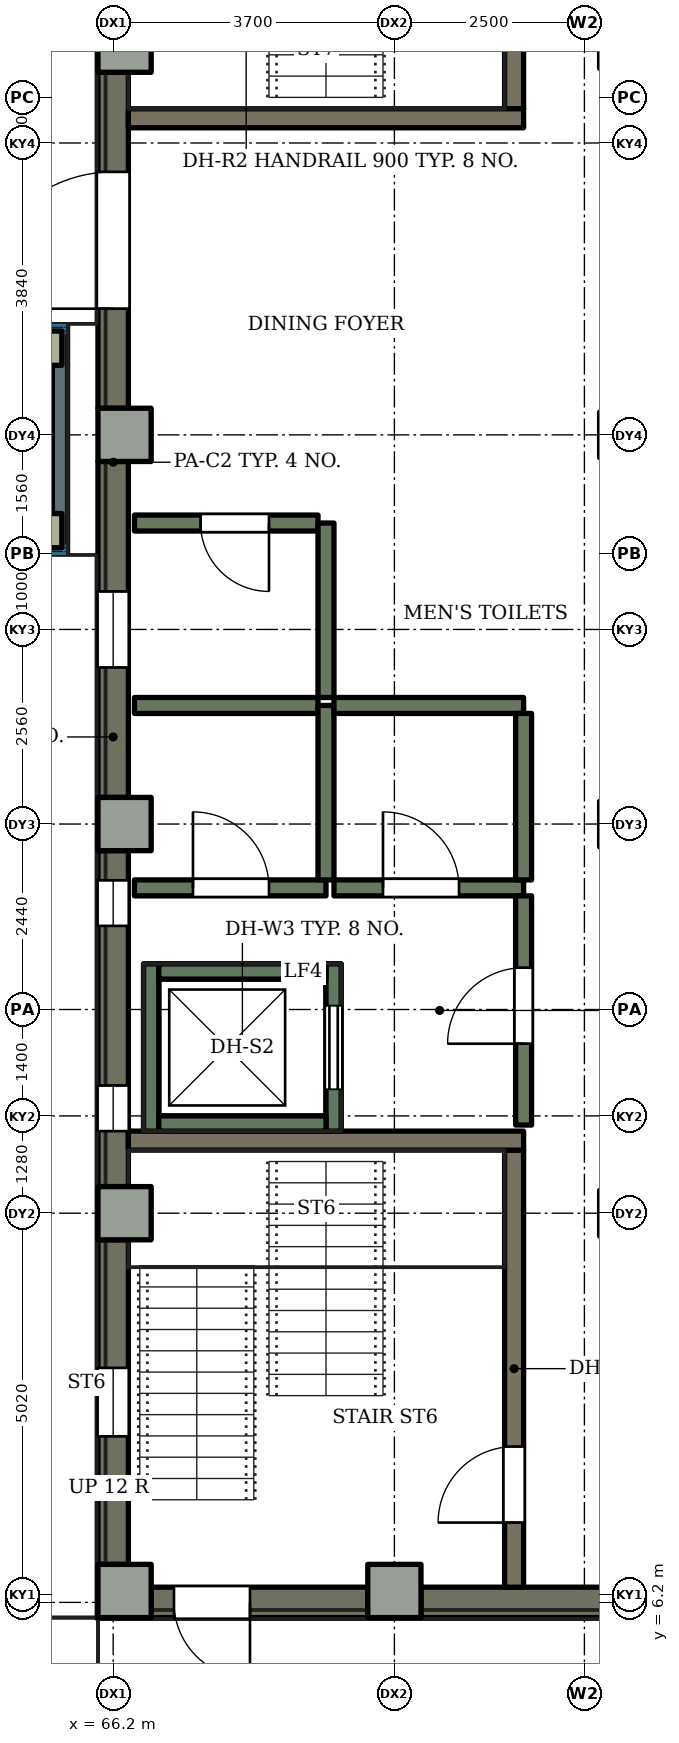
"""IFC4 building model, lengths in metres.
Left out: names, types, materials, properties, quantities, classifications, styles, units other than length and angle.
Written with IfcOpenShell. Run it as: python <this file> out.ifc"""

import sys

from ifc_helpers import new_model, si_unit, direction, frame, frame_2d, origin, origin_2d, place, context, subcontext, project, spatial, rectangle, extrude, element, fill, save


model = new_model("IFC4")
c1 = context("Model", 3, precision=1e-05, world=origin(), true_north=direction((0.0, 1.0)))
c2 = subcontext(c1, "Body", "Model", "MODEL_VIEW")
j1 = project(units=[si_unit("LENGTHUNIT", "METRE"), si_unit("PLANEANGLEUNIT", "RADIAN")], contexts=[c1])
p1 = place(None, origin())
s1 = spatial("IfcSite", under=j1, at=p1, CompositionType="ELEMENT")
p2 = place(p1, origin())
s2 = spatial("IfcBuilding", under=s1, at=p2, CompositionType="ELEMENT")
p3 = place(p2, origin())
s3 = spatial("IfcBuildingStorey", under=s2, at=p3, CompositionType="ELEMENT", Elevation=0.0)
for number, where, z_axis, x_axis in (
    (1, (66.35, 6.35, 0.0), (0.0, 0.0, 1.0), (1.0, 0.0, 0.0)),
    (2, (69.9, 6.35, 0.0), (0.0, 0.0, 1.0), (1.0, 0.0, 0.0)),
    (3, (66.35, 11.32, 0.0), (0.0, 0.0, 1.0), (1.0, 0.0, 0.0)),
    (4, (66.35, 16.44, 0.0), (0.0, 0.0, 1.0), (1.0, 0.0, 0.0)),
    (5, (66.35, 21.56, 0.0), (0.0, 0.0, 1.0), (1.0, 0.0, 0.0)),
    (6, (66.35, 26.68, 0.0), (0.0, 0.0, 1.0), (1.0, 0.0, 0.0)),
):
    element("IfcColumn", number, at=place(p3, frame(where, z_axis=z_axis, x_axis=x_axis)), inside=s3, PredefinedType="COLUMN", context=c2, shape_type="SweptSolid", body=[
        extrude(rectangle(XDim=0.7, YDim=0.7, at=origin_2d()), origin(), (0.0, 0.0, 1.0), 4.2),
    ])
p4 = place(p3, frame((69.55, 6.2, 0.0), z_axis=(0.0, 0.0, 1.0), x_axis=(-1.0, 0.0, 0.0)))
e7 = element("IfcWall", 7, at=p4, inside=s3, PredefinedType="SOLIDWALL", context=c2, shape_type="SweptSolid", body=[
    extrude(rectangle(XDim=2.85, YDim=0.4, at=frame_2d((1.425, 0.0))), origin(), (0.0, 0.0, 1.0), 4.2),
])
p5 = place(p4, frame((1.55, 0.0, 0.0)))
e8 = element("IfcOpeningElement", 8, at=p5, cuts=e7, PredefinedType="OPENING", context=c2, shape_type="SweptSolid", body=[
    extrude(rectangle(XDim=1.0, YDim=2.4, at=frame_2d((0.5, 1.2))), frame((0.0, 0.21, 0.0), z_axis=(0.0, -1.0, 0.0), x_axis=(1.0, 0.0, 0.0)), (0.0, 0.0, 1.0), 0.42),
])
p6 = place(p3, frame((73.25, 6.2, 0.0), z_axis=(0.0, 0.0, 1.0), x_axis=(-1.0, 0.0, 0.0)))
e9 = element("IfcWall", 9, at=p6, inside=s3, PredefinedType="SOLIDWALL", context=c2, shape_type="SweptSolid", body=[
    extrude(rectangle(XDim=3.0, YDim=0.4, at=frame_2d((1.5, 0.0))), origin(), (0.0, 0.0, 1.0), 4.2),
])
p7 = place(p3, frame((66.2, 6.7, 0.0), z_axis=(0.0, 0.0, 1.0), x_axis=(0.0, 1.0, 0.0)))
e10 = element("IfcWall", 10, at=p7, inside=s3, PredefinedType="SOLIDWALL", context=c2, shape_type="SweptSolid", body=[
    extrude(rectangle(XDim=4.27, YDim=0.4, at=frame_2d((2.135, 0.0))), origin(), (0.0, 0.0, 1.0), 4.2),
])
p8 = place(p7, frame((1.685, 0.0, 0.9)))
e11 = element("IfcOpeningElement", 11, at=p8, cuts=e10, PredefinedType="OPENING", context=c2, shape_type="SweptSolid", body=[
    extrude(rectangle(XDim=0.9, YDim=1.8, at=frame_2d((0.45, 0.9))), frame((0.0, 0.21, 0.0), z_axis=(0.0, -1.0, 0.0), x_axis=(1.0, 0.0, 0.0)), (0.0, 0.0, 1.0), 0.42),
])
p9 = place(p3, frame((66.2, 11.67, 0.0), z_axis=(0.0, 0.0, 1.0), x_axis=(0.0, 1.0, 0.0)))
e12 = element("IfcWall", 12, at=p9, inside=s3, PredefinedType="SOLIDWALL", context=c2, shape_type="SweptSolid", body=[
    extrude(rectangle(XDim=4.42, YDim=0.4, at=frame_2d((2.21, 0.0))), origin(), (0.0, 0.0, 1.0), 4.2),
])
p10 = place(p9, frame((0.73, 0.0, 1.5)))
e13 = element("IfcOpeningElement", 13, at=p10, cuts=e12, PredefinedType="OPENING", context=c2, shape_type="SweptSolid", body=[
    extrude(rectangle(XDim=0.6, YDim=1.2, at=frame_2d((0.3, 0.6))), frame((0.0, 0.21, 0.0), z_axis=(0.0, -1.0, 0.0), x_axis=(1.0, 0.0, 0.0)), (0.0, 0.0, 1.0), 0.42),
])
p11 = place(p9, frame((3.43, 0.0, 1.5)))
e14 = element("IfcOpeningElement", 14, at=p11, cuts=e12, PredefinedType="OPENING", context=c2, shape_type="SweptSolid", body=[
    extrude(rectangle(XDim=0.6, YDim=1.2, at=frame_2d((0.3, 0.6))), frame((0.0, 0.21, 0.0), z_axis=(0.0, -1.0, 0.0), x_axis=(1.0, 0.0, 0.0)), (0.0, 0.0, 1.0), 0.42),
])
p12 = place(p3, frame((66.2, 16.79, 0.0), z_axis=(0.0, 0.0, 1.0), x_axis=(0.0, 1.0, 0.0)))
e15 = element("IfcWall", 15, at=p12, inside=s3, PredefinedType="SOLIDWALL", context=c2, shape_type="SweptSolid", body=[
    extrude(rectangle(XDim=4.42, YDim=0.4, at=frame_2d((2.21, 0.0))), origin(), (0.0, 0.0, 1.0), 4.2),
])
p13 = place(p12, frame((1.71, 0.0, 0.9)))
e16 = element("IfcOpeningElement", 16, at=p13, cuts=e15, PredefinedType="OPENING", context=c2, shape_type="SweptSolid", body=[
    extrude(rectangle(XDim=1.0, YDim=2.4, at=frame_2d((0.5, 1.2))), frame((0.0, 0.21, 0.0), z_axis=(0.0, -1.0, 0.0), x_axis=(1.0, 0.0, 0.0)), (0.0, 0.0, 1.0), 0.42),
])
p14 = place(p3, frame((66.2, 21.91, 0.0), z_axis=(0.0, 0.0, 1.0), x_axis=(0.0, 1.0, 0.0)))
e17 = element("IfcWall", 17, at=p14, inside=s3, PredefinedType="SOLIDWALL", context=c2, shape_type="SweptSolid", body=[
    extrude(rectangle(XDim=4.42, YDim=0.4, at=frame_2d((2.21, 0.0))), origin(), (0.0, 0.0, 1.0), 4.2),
])
p15 = place(p14, frame((1.31, 0.0, 0.0)))
e18 = element("IfcOpeningElement", 18, at=p15, cuts=e17, PredefinedType="OPENING", context=c2, shape_type="SweptSolid", body=[
    extrude(rectangle(XDim=1.8, YDim=2.4, at=frame_2d((0.9, 1.2))), frame((0.0, 0.21, 0.0), z_axis=(0.0, -1.0, 0.0), x_axis=(1.0, 0.0, 0.0)), (0.0, 0.0, 1.0), 0.42),
])
p16 = place(p3, frame((71.475, 6.4, 0.0), z_axis=(0.0, 0.0, 1.0), x_axis=(0.0, 1.0, 0.0)))
e19 = element("IfcWall", 19, at=p16, inside=s3, PredefinedType="SHEAR", context=c2, shape_type="SweptSolid", body=[
    extrude(rectangle(XDim=5.75, YDim=0.25, at=frame_2d((2.875, 0.0))), origin(), (0.0, 0.0, 1.0), 4.2),
])
p17 = place(p16, frame((0.85, 0.0, 0.0)))
e20 = element("IfcOpeningElement", 20, at=p17, cuts=e19, PredefinedType="OPENING", context=c2, shape_type="SweptSolid", body=[
    extrude(rectangle(XDim=1.0, YDim=2.1, at=frame_2d((0.5, 1.05))), frame((0.0, 0.135, 0.0), z_axis=(0.0, -1.0, 0.0), x_axis=(1.0, 0.0, 0.0)), (0.0, 0.0, 1.0), 0.27),
])
p18 = place(p3, frame((66.4, 12.275, 0.0), z_axis=(0.0, 0.0, 1.0), x_axis=(1.0, 0.0, 0.0)))
e21 = element("IfcWall", 21, at=p18, inside=s3, PredefinedType="SHEAR", context=c2, shape_type="SweptSolid", body=[
    extrude(rectangle(XDim=5.2, YDim=0.25, at=frame_2d((2.6, 0.0))), origin(), (0.0, 0.0, 1.0), 4.2),
])
p19 = place(p3, frame((71.475, 25.85, 0.0), z_axis=(0.0, 0.0, 1.0), x_axis=(0.0, 1.0, 0.0)))
e22 = element("IfcWall", 22, at=p19, inside=s3, PredefinedType="SHEAR", context=c2, shape_type="SweptSolid", body=[
    extrude(rectangle(XDim=5.75, YDim=0.25, at=frame_2d((2.875, 0.0))), origin(), (0.0, 0.0, 1.0), 4.2),
])
p20 = place(p19, frame((3.914, 0.0, 0.0)))
e23 = element("IfcOpeningElement", 23, at=p20, cuts=e22, PredefinedType="OPENING", context=c2, shape_type="SweptSolid", body=[
    extrude(rectangle(XDim=1.0, YDim=2.1, at=frame_2d((0.5, 1.05))), frame((0.0, 0.135, 0.0), z_axis=(0.0, -1.0, 0.0), x_axis=(1.0, 0.0, 0.0)), (0.0, 0.0, 1.0), 0.27),
])
p21 = place(p3, frame((66.4, 25.725, 0.0), z_axis=(0.0, 0.0, 1.0), x_axis=(1.0, 0.0, 0.0)))
e24 = element("IfcWall", 24, at=p21, inside=s3, PredefinedType="SHEAR", context=c2, shape_type="SweptSolid", body=[
    extrude(rectangle(XDim=5.2, YDim=0.25, at=frame_2d((2.6, 0.0))), origin(), (0.0, 0.0, 1.0), 4.2),
])
p22 = place(p3, frame((66.7, 12.4, 0.0), z_axis=(0.0, 0.0, 1.0), x_axis=(0.0, 1.0, 0.0)))
e25 = element("IfcWall", 25, at=p22, inside=s3, PredefinedType="SHEAR", context=c2, shape_type="SweptSolid", body=[
    extrude(rectangle(XDim=2.2, YDim=0.2, at=frame_2d((1.1, 0.0))), origin(), (0.0, 0.0, 1.0), 4.2),
])
p23 = place(p3, frame((69.1, 12.4, 0.0), z_axis=(0.0, 0.0, 1.0), x_axis=(0.0, 1.0, 0.0)))
e26 = element("IfcWall", 26, at=p23, inside=s3, PredefinedType="SHEAR", context=c2, shape_type="SweptSolid", body=[
    extrude(rectangle(XDim=2.2, YDim=0.2, at=frame_2d((1.1, 0.0))), origin(), (0.0, 0.0, 1.0), 4.2),
])
p24 = place(p23, frame((0.55, 0.0, 0.0)))
e27 = element("IfcOpeningElement", 27, at=p24, cuts=e26, PredefinedType="OPENING", context=c2, shape_type="SweptSolid", body=[
    extrude(rectangle(XDim=1.1, YDim=2.1, at=frame_2d((0.55, 1.05))), frame((0.0, 0.11, 0.0), z_axis=(0.0, -1.0, 0.0), x_axis=(1.0, 0.0, 0.0)), (0.0, 0.0, 1.0), 0.22),
])
for number, where, z_axis, x_axis in (
    (28, (66.8, 12.5, 0.0), (0.0, 0.0, 1.0), (1.0, 0.0, 0.0)),
    (29, (66.8, 14.5, 0.0), (0.0, 0.0, 1.0), (1.0, 0.0, 0.0)),
):
    element("IfcWall", number, at=place(p3, frame(where, z_axis=z_axis, x_axis=x_axis)), inside=s3, PredefinedType="SHEAR", context=c2, shape_type="SweptSolid", body=[
        extrude(rectangle(XDim=2.2, YDim=0.2, at=frame_2d((1.1, 0.0))), origin(), (0.0, 0.0, 1.0), 4.2),
    ])
for number, where, z_axis, x_axis in (
    (30, (66.7, 12.4, -1.4), (0.0, 0.0, 1.0), (0.0, 1.0, 0.0)),
    (31, (69.1, 12.4, -1.4), (0.0, 0.0, 1.0), (0.0, 1.0, 0.0)),
):
    element("IfcWall", number, at=place(p3, frame(where, z_axis=z_axis, x_axis=x_axis)), inside=s3, PredefinedType="SHEAR", context=c2, shape_type="SweptSolid", body=[
        extrude(rectangle(XDim=2.2, YDim=0.2, at=frame_2d((1.1, 0.0))), origin(), (0.0, 0.0, 1.0), 1.4),
    ])
for number, where, z_axis, x_axis in (
    (32, (66.8, 12.5, -1.4), (0.0, 0.0, 1.0), (1.0, 0.0, 0.0)),
    (33, (66.8, 14.5, -1.4), (0.0, 0.0, 1.0), (1.0, 0.0, 0.0)),
):
    element("IfcWall", number, at=place(p3, frame(where, z_axis=z_axis, x_axis=x_axis)), inside=s3, PredefinedType="SHEAR", context=c2, shape_type="SweptSolid", body=[
        extrude(rectangle(XDim=2.2, YDim=0.2, at=frame_2d((1.1, 0.0))), origin(), (0.0, 0.0, 1.0), 1.4),
    ])
for number, where, z_axis, x_axis in (
    (34, (72.9, 11.32, 0.0), (0.0, 0.0, 1.0), (1.0, 0.0, 0.0)),
    (35, (72.9, 16.44, 0.0), (0.0, 0.0, 1.0), (1.0, 0.0, 0.0)),
    (36, (72.9, 21.56, 0.0), (0.0, 0.0, 1.0), (1.0, 0.0, 0.0)),
    (37, (72.9, 26.68, 0.0), (0.0, 0.0, 1.0), (1.0, 0.0, 0.0)),
):
    element("IfcColumn", number, at=place(p3, frame(where, z_axis=z_axis, x_axis=x_axis)), inside=s3, PredefinedType="COLUMN", context=c2, shape_type="SweptSolid", body=[
        extrude(rectangle(XDim=0.6, YDim=0.6, at=origin_2d()), origin(), (0.0, 0.0, 1.0), 4.2),
    ])
for number, where, z_axis, x_axis in (
    (38, (65.3, 20.3, 0.0), (0.0, 0.0, 1.0), (1.0, 0.0, 0.0)),
    (39, (65.3, 22.7, 0.0), (0.0, 0.0, 1.0), (1.0, 0.0, 0.0)),
):
    element("IfcColumn", number, at=place(p3, frame(where, z_axis=z_axis, x_axis=x_axis)), inside=s3, PredefinedType="COLUMN", context=c2, shape_type="SweptSolid", body=[
        extrude(rectangle(XDim=0.45, YDim=0.45, at=origin_2d()), origin(), (0.0, 0.0, 1.0), 3.78),
    ])
p25 = place(p3, frame((65.5, 20.0, 4.0), z_axis=(0.0, 0.0, 1.0), x_axis=(0.0, 1.0, 0.0)))
e40 = element("IfcWall", 40, at=p25, inside=s3, PredefinedType="PARAPET", context=c2, shape_type="SweptSolid", body=[
    extrude(rectangle(XDim=3.0, YDim=0.2, at=frame_2d((1.5, 0.0))), origin(), (0.0, 0.0, 1.0), 0.45),
])
for number, where, z_axis, x_axis in (
    (41, (66.4, 11.59, 0.0), (0.0, 0.0, 1.0), (0.0, -1.0, 0.0)),
    (42, (66.4, 16.71, 0.0), (0.0, 0.0, 1.0), (0.0, -1.0, 0.0)),
    (43, (66.4, 21.83, 0.0), (0.0, 0.0, 1.0), (0.0, -1.0, 0.0)),
    (44, (66.4, 26.95, 0.0), (0.0, 0.0, 1.0), (0.0, -1.0, 0.0)),
):
    element("IfcWall", number, at=place(p3, frame(where, z_axis=z_axis, x_axis=x_axis)), inside=s3, PredefinedType="PARTITIONING", context=c2, shape_type="SweptSolid", body=[
        extrude(rectangle(XDim=0.54, YDim=0.21, at=frame_2d((0.27, 0.0))), origin(), (0.0, 0.0, 1.0), 3.98),
    ])
p26 = place(p3, frame((66.48, 15.6, 0.0), z_axis=(0.0, 0.0, 1.0), x_axis=(1.0, 0.0, 0.0)))
e45 = element("IfcWall", 45, at=p26, inside=s3, PredefinedType="PARTITIONING", context=c2, shape_type="SweptSolid", body=[
    extrude(rectangle(XDim=2.52, YDim=0.21, at=frame_2d((1.26, 0.0))), origin(), (0.0, 0.0, 1.0), 3.98),
])
p27 = place(p26, frame((0.77, 0.0, 0.0)))
e46 = element("IfcOpeningElement", 46, at=p27, cuts=e45, PredefinedType="OPENING", context=c2, shape_type="SweptSolid", body=[
    extrude(rectangle(XDim=1.0, YDim=2.1, at=frame_2d((0.5, 1.05))), frame((0.0, 0.115, 0.0), z_axis=(0.0, -1.0, 0.0), x_axis=(1.0, 0.0, 0.0)), (0.0, 0.0, 1.0), 0.23),
])
p28 = place(p3, frame((68.895, 18.0, 0.0), z_axis=(0.0, 0.0, 1.0), x_axis=(-1.0, 0.0, 0.0)))
e47 = element("IfcWall", 47, at=p28, inside=s3, PredefinedType="PARTITIONING", context=c2, shape_type="SweptSolid", body=[
    extrude(rectangle(XDim=2.415, YDim=0.21, at=frame_2d((1.208, 0.0))), origin(), (0.0, 0.0, 1.0), 3.98),
])
p29 = place(p3, frame((68.895, 20.4, 0.0), z_axis=(0.0, 0.0, 1.0), x_axis=(-1.0, 0.0, 0.0)))
e48 = element("IfcWall", 48, at=p29, inside=s3, PredefinedType="PARTITIONING", context=c2, shape_type="SweptSolid", body=[
    extrude(rectangle(XDim=2.415, YDim=0.21, at=frame_2d((1.208, 0.0))), origin(), (0.0, 0.0, 1.0), 3.98),
])
p30 = place(p29, frame((0.645, 0.0, 0.0)))
e49 = element("IfcOpeningElement", 49, at=p30, cuts=e48, PredefinedType="OPENING", context=c2, shape_type="SweptSolid", body=[
    extrude(rectangle(XDim=0.9, YDim=2.1, at=frame_2d((0.45, 1.05))), frame((0.0, 0.115, 0.0), z_axis=(0.0, -1.0, 0.0), x_axis=(1.0, 0.0, 0.0)), (0.0, 0.0, 1.0), 0.23),
])
for number, where, z_axis, x_axis in (
    (50, (69.0, 15.705, 0.0), (0.0, 0.0, 1.0), (0.0, 1.0, 0.0)),
    (51, (69.0, 18.105, 0.0), (0.0, 0.0, 1.0), (0.0, 1.0, 0.0)),
):
    element("IfcWall", number, at=place(p3, frame(where, z_axis=z_axis, x_axis=x_axis)), inside=s3, PredefinedType="PARTITIONING", context=c2, shape_type="SweptSolid", body=[
        extrude(rectangle(XDim=2.295, YDim=0.21, at=frame_2d((1.147, 0.0))), origin(), (0.0, 0.0, 1.0), 3.98),
    ])
p31 = place(p3, frame((69.105, 15.6, 0.0), z_axis=(0.0, 0.0, 1.0), x_axis=(1.0, 0.0, 0.0)))
e52 = element("IfcWall", 52, at=p31, inside=s3, PredefinedType="PARTITIONING", context=c2, shape_type="SweptSolid", body=[
    extrude(rectangle(XDim=2.495, YDim=0.21, at=frame_2d((1.248, 0.0))), origin(), (0.0, 0.0, 1.0), 3.98),
])
p32 = place(p31, frame((0.645, 0.0, 0.0)))
e53 = element("IfcOpeningElement", 53, at=p32, cuts=e52, PredefinedType="OPENING", context=c2, shape_type="SweptSolid", body=[
    extrude(rectangle(XDim=1.0, YDim=2.1, at=frame_2d((0.5, 1.05))), frame((0.0, 0.115, 0.0), z_axis=(0.0, -1.0, 0.0), x_axis=(1.0, 0.0, 0.0)), (0.0, 0.0, 1.0), 0.23),
])
p33 = place(p3, frame((69.105, 18.0, 0.0), z_axis=(0.0, 0.0, 1.0), x_axis=(1.0, 0.0, 0.0)))
e54 = element("IfcWall", 54, at=p33, inside=s3, PredefinedType="PARTITIONING", context=c2, shape_type="SweptSolid", body=[
    extrude(rectangle(XDim=2.495, YDim=0.21, at=frame_2d((1.248, 0.0))), origin(), (0.0, 0.0, 1.0), 3.98),
])
p34 = place(p3, frame((69.63, 6.4, 0.0), z_axis=(0.0, 0.0, 1.0), x_axis=(1.0, 0.0, 0.0)))
e55 = element("IfcWall", 55, at=p34, inside=s3, PredefinedType="PARTITIONING", context=c2, shape_type="SweptSolid", body=[
    extrude(rectangle(XDim=0.54, YDim=0.21, at=frame_2d((0.27, 0.0))), origin(), (0.0, 0.0, 1.0), 3.98),
])
p35 = place(p3, frame((71.6, 12.48, 0.0), z_axis=(0.0, 0.0, 1.0), x_axis=(0.0, 1.0, 0.0)))
e56 = element("IfcWall", 56, at=p35, inside=s3, PredefinedType="PARTITIONING", context=c2, shape_type="SweptSolid", body=[
    extrude(rectangle(XDim=3.015, YDim=0.21, at=frame_2d((1.508, 0.0))), origin(), (0.0, 0.0, 1.0), 3.98),
])
p36 = place(p35, frame((1.07, 0.0, 0.0)))
e57 = element("IfcOpeningElement", 57, at=p36, cuts=e56, PredefinedType="OPENING", context=c2, shape_type="SweptSolid", body=[
    extrude(rectangle(XDim=1.0, YDim=2.1, at=frame_2d((0.5, 1.05))), frame((0.0, 0.115, 0.0), z_axis=(0.0, -1.0, 0.0), x_axis=(1.0, 0.0, 0.0)), (0.0, 0.0, 1.0), 0.23),
])
p37 = place(p3, frame((71.6, 15.705, 0.0), z_axis=(0.0, 0.0, 1.0), x_axis=(0.0, 1.0, 0.0)))
e58 = element("IfcWall", 58, at=p37, inside=s3, PredefinedType="PARTITIONING", context=c2, shape_type="SweptSolid", body=[
    extrude(rectangle(XDim=2.19, YDim=0.21, at=frame_2d((1.095, 0.0))), origin(), (0.0, 0.0, 1.0), 3.98),
])
p38 = place(p5, origin())
e59 = element("IfcDoor", 59, at=p38, inside=s3, OperationType="SINGLE_SWING_LEFT", PredefinedType="DOOR", context=c2, shape_type="SweptSolid", body=[
    extrude(rectangle(XDim=1.0, YDim=2.4, at=frame_2d((0.5, 1.2))), frame((0.0, 0.025, 0.0), z_axis=(0.0, -1.0, 0.0), x_axis=(1.0, 0.0, 0.0)), (0.0, 0.0, 1.0), 0.05),
])
fill(e8, e59)
p39 = place(p15, origin())
e60 = element("IfcDoor", 60, at=p39, inside=s3, OperationType="DOUBLE_DOOR_SINGLE_SWING", PredefinedType="DOOR", context=c2, shape_type="SweptSolid", body=[
    extrude(rectangle(XDim=1.8, YDim=2.4, at=frame_2d((0.9, 1.2))), frame((0.0, 0.025, 0.0), z_axis=(0.0, -1.0, 0.0), x_axis=(1.0, 0.0, 0.0)), (0.0, 0.0, 1.0), 0.05),
])
fill(e18, e60)
p40 = place(p8, origin())
e61 = element("IfcWindow", 61, at=p40, inside=s3, PartitioningType="SINGLE_PANEL", PredefinedType="WINDOW", context=c2, shape_type="SweptSolid", body=[
    extrude(rectangle(XDim=0.9, YDim=1.8, at=frame_2d((0.45, 0.9))), frame((0.0, 0.03, 0.0), z_axis=(0.0, -1.0, 0.0), x_axis=(1.0, 0.0, 0.0)), (0.0, 0.0, 1.0), 0.06),
])
fill(e11, e61)
p41 = place(p10, origin())
e62 = element("IfcWindow", 62, at=p41, inside=s3, PartitioningType="SINGLE_PANEL", PredefinedType="WINDOW", context=c2, shape_type="SweptSolid", body=[
    extrude(rectangle(XDim=0.6, YDim=1.2, at=frame_2d((0.3, 0.6))), frame((0.0, 0.03, 0.0), z_axis=(0.0, -1.0, 0.0), x_axis=(1.0, 0.0, 0.0)), (0.0, 0.0, 1.0), 0.06),
])
fill(e13, e62)
p42 = place(p11, origin())
e63 = element("IfcWindow", 63, at=p42, inside=s3, PartitioningType="SINGLE_PANEL", PredefinedType="WINDOW", context=c2, shape_type="SweptSolid", body=[
    extrude(rectangle(XDim=0.6, YDim=1.2, at=frame_2d((0.3, 0.6))), frame((0.0, 0.03, 0.0), z_axis=(0.0, -1.0, 0.0), x_axis=(1.0, 0.0, 0.0)), (0.0, 0.0, 1.0), 0.06),
])
fill(e14, e63)
p43 = place(p13, origin())
e64 = element("IfcWindow", 64, at=p43, inside=s3, PartitioningType="SINGLE_PANEL", PredefinedType="WINDOW", context=c2, shape_type="SweptSolid", body=[
    extrude(rectangle(XDim=1.0, YDim=2.4, at=frame_2d((0.5, 1.2))), frame((0.0, 0.03, 0.0), z_axis=(0.0, -1.0, 0.0), x_axis=(1.0, 0.0, 0.0)), (0.0, 0.0, 1.0), 0.06),
])
fill(e16, e64)
p44 = place(p24, origin())
e65 = element("IfcDoor", 65, at=p44, inside=s3, OperationType="SLIDING_TO_LEFT", PredefinedType="DOOR", context=c2, shape_type="SweptSolid", body=[
    extrude(rectangle(XDim=1.1, YDim=2.1, at=frame_2d((0.55, 1.05))), frame((0.0, 0.025, 0.0), z_axis=(0.0, -1.0, 0.0), x_axis=(1.0, 0.0, 0.0)), (0.0, 0.0, 1.0), 0.05),
])
fill(e27, e65)
p45 = place(p17, origin())
e66 = element("IfcDoor", 66, at=p45, inside=s3, OperationType="SINGLE_SWING_LEFT", PredefinedType="DOOR", context=c2, shape_type="SweptSolid", body=[
    extrude(rectangle(XDim=1.0, YDim=2.1, at=frame_2d((0.5, 1.05))), frame((0.0, 0.025, 0.0), z_axis=(0.0, -1.0, 0.0), x_axis=(1.0, 0.0, 0.0)), (0.0, 0.0, 1.0), 0.05),
])
fill(e20, e66)
p46 = place(p27, origin())
e67 = element("IfcDoor", 67, at=p46, inside=s3, OperationType="SINGLE_SWING_LEFT", PredefinedType="DOOR", context=c2, shape_type="SweptSolid", body=[
    extrude(rectangle(XDim=1.0, YDim=2.1, at=frame_2d((0.5, 1.05))), frame((0.0, 0.025, 0.0), z_axis=(0.0, -1.0, 0.0), x_axis=(1.0, 0.0, 0.0)), (0.0, 0.0, 1.0), 0.05),
])
fill(e46, e67)
p47 = place(p30, origin())
e68 = element("IfcDoor", 68, at=p47, inside=s3, OperationType="SINGLE_SWING_LEFT", PredefinedType="DOOR", context=c2, shape_type="SweptSolid", body=[
    extrude(rectangle(XDim=0.9, YDim=2.1, at=frame_2d((0.45, 1.05))), frame((0.0, 0.025, 0.0), z_axis=(0.0, -1.0, 0.0), x_axis=(1.0, 0.0, 0.0)), (0.0, 0.0, 1.0), 0.05),
])
fill(e49, e68)
p48 = place(p32, origin())
e69 = element("IfcDoor", 69, at=p48, inside=s3, OperationType="SINGLE_SWING_LEFT", PredefinedType="DOOR", context=c2, shape_type="SweptSolid", body=[
    extrude(rectangle(XDim=1.0, YDim=2.1, at=frame_2d((0.5, 1.05))), frame((0.0, 0.025, 0.0), z_axis=(0.0, -1.0, 0.0), x_axis=(1.0, 0.0, 0.0)), (0.0, 0.0, 1.0), 0.05),
])
fill(e53, e69)
p49 = place(p36, origin())
e70 = element("IfcDoor", 70, at=p49, inside=s3, OperationType="SINGLE_SWING_LEFT", PredefinedType="DOOR", context=c2, shape_type="SweptSolid", body=[
    extrude(rectangle(XDim=1.0, YDim=2.1, at=frame_2d((0.5, 1.05))), frame((0.0, 0.025, 0.0), z_axis=(0.0, -1.0, 0.0), x_axis=(1.0, 0.0, 0.0)), (0.0, 0.0, 1.0), 0.05),
])
fill(e57, e70)
save(model, sys.argv[1])
